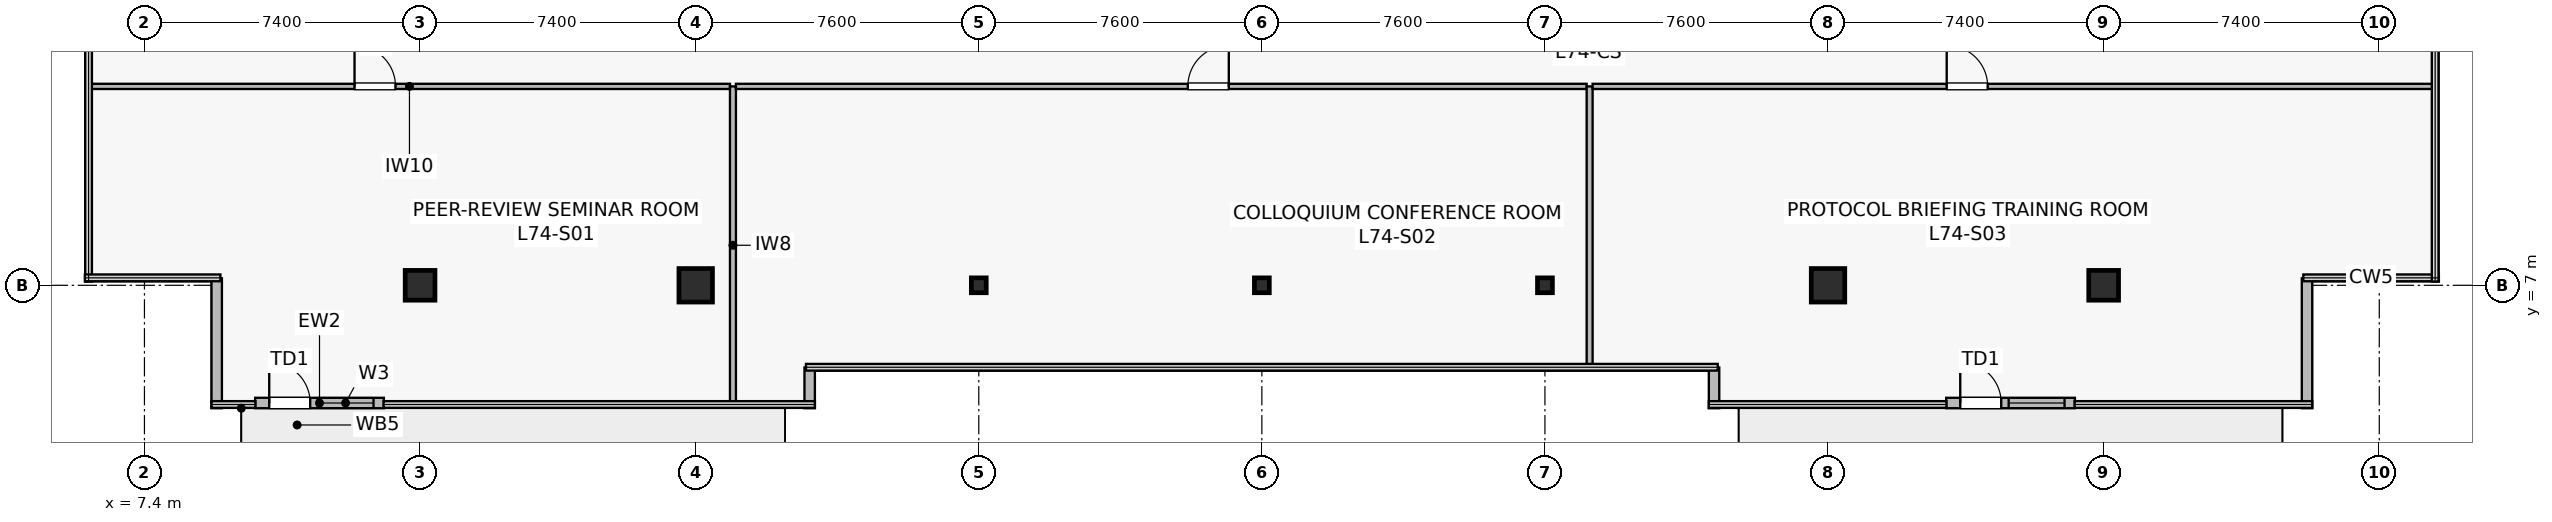
"""IFC4 building model, lengths in metres.
Left out: names, types, materials, properties, quantities, classifications, styles, units other than length and angle.
Written with IfcOpenShell. Run it as: python <this file> out.ifc"""

import sys

from ifc_helpers import new_model, si_unit, direction, frame, frame_2d, origin, origin_2d, place, context, subcontext, project, spatial, rectangle, i_section, extrude, source, transform, mapped, element, fill, save


model = new_model("IFC4")
c1 = context("Model", 3, precision=1e-05, world=origin(), true_north=direction((0.0, 1.0)))
c2 = subcontext(c1, "Body", "Model", "MODEL_VIEW")
j1 = project(units=[si_unit("LENGTHUNIT", "METRE"), si_unit("PLANEANGLEUNIT", "RADIAN")], contexts=[c1])
p1 = place(None, origin())
s1 = spatial("IfcSite", under=j1, at=p1, CompositionType="ELEMENT")
p2 = place(p1, origin())
s2 = spatial("IfcBuilding", under=s1, at=p2, CompositionType="ELEMENT")
p3 = place(p2, frame((0.0, 0.0, 310.2)))
s3 = spatial("IfcBuildingStorey", under=s2, at=p3, CompositionType="ELEMENT", Elevation=310.2)
m1 = source(origin(), c2, "Body", "SweptSolid", [
    extrude(rectangle(XDim=0.8, YDim=0.8, at=origin_2d()), origin(), (0.0, 0.0, 1.0), 4.2),
])
p4 = place(p3, frame((14.8, 7.0, 0.0), z_axis=(0.0, 0.0, 1.0), x_axis=(1.0, 0.0, 0.0)))
e1 = element("IfcColumn", 1, at=p4, inside=s3, PredefinedType="COLUMN", context=c2, shape_type="MappedRepresentation", body=[
    mapped(m1, transform((0.0, 0.0, 0.0), scale=1.0)),
])
m2 = source(origin(), c2, "Body", "SweptSolid", [
    extrude(rectangle(XDim=0.9, YDim=0.9, at=origin_2d()), origin(), (0.0, 0.0, 1.0), 4.2),
])
for number, where, z_axis, x_axis in (
    (2, (22.2, 7.0, 0.0), (0.0, 0.0, 1.0), (1.0, 0.0, 0.0)),
    (3, (52.6, 7.0, 0.0), (0.0, 0.0, 1.0), (1.0, 0.0, 0.0)),
):
    element("IfcColumn", number, at=place(p3, frame(where, z_axis=z_axis, x_axis=x_axis)), inside=s3, PredefinedType="COLUMN", context=c2, shape_type="MappedRepresentation", body=[
        mapped(m2, transform((0.0, 0.0, 0.0), scale=1.0)),
    ])
p5 = place(p3, frame((60.0, 7.0, 0.0), z_axis=(0.0, 0.0, 1.0), x_axis=(1.0, 0.0, 0.0)))
e4 = element("IfcColumn", 4, at=p5, inside=s3, PredefinedType="COLUMN", context=c2, shape_type="MappedRepresentation", body=[
    mapped(m1, transform((0.0, 0.0, 0.0), scale=1.0)),
])
m3 = source(origin(), c2, "Body", "SweptSolid", [
    extrude(i_section(OverallWidth=0.4, OverallDepth=0.4, WebThickness=0.021, FlangeThickness=0.021, at=origin_2d()), origin(), (0.0, 0.0, 1.0), 4.2),
])
for number, where, z_axis, x_axis in (
    (5, (29.8, 7.0, 0.0), (0.0, 0.0, 1.0), (1.0, 0.0, 0.0)),
    (6, (37.4, 7.0, 0.0), (0.0, 0.0, 1.0), (1.0, 0.0, 0.0)),
    (7, (45.0, 7.0, 0.0), (0.0, 0.0, 1.0), (1.0, 0.0, 0.0)),
):
    element("IfcColumn", number, at=place(p3, frame(where, z_axis=z_axis, x_axis=x_axis)), inside=s3, PredefinedType="COLUMN", context=c2, shape_type="MappedRepresentation", body=[
        mapped(m3, transform((0.0, 0.0, 0.0), scale=1.0)),
    ])
p6 = place(p3, frame((10.372, 3.84, 0.0), z_axis=(0.0, 0.0, 1.0), x_axis=(1.0, 0.0, 0.0)))
e8 = element("IfcWall", 8, at=p6, inside=s3, PredefinedType="STANDARD", context=c2, shape_type="SweptSolid", body=[
    extrude(rectangle(XDim=3.456, YDim=0.28, at=frame_2d((1.728, 0.0))), origin(), (0.0, 0.0, 1.0), 3.9),
])
p7 = place(p6, frame((0.378, 0.0, 0.0)))
e9 = element("IfcOpeningElement", 9, at=p7, cuts=e8, PredefinedType="OPENING", context=c2, shape_type="SweptSolid", body=[
    extrude(rectangle(XDim=1.1, YDim=2.2, at=frame_2d((0.55, 1.1))), frame((0.0, 0.15, 0.0), z_axis=(0.0, -1.0, 0.0), x_axis=(1.0, 0.0, 0.0)), (0.0, 0.0, 1.0), 0.3),
])
p8 = place(p6, frame((1.678, 0.0, 0.9)))
e10 = element("IfcOpeningElement", 10, at=p8, cuts=e8, PredefinedType="OPENING", context=c2, shape_type="SweptSolid", body=[
    extrude(rectangle(XDim=1.5, YDim=2.2, at=frame_2d((0.75, 1.1))), frame((0.0, 0.15, 0.0), z_axis=(0.0, -1.0, 0.0), x_axis=(1.0, 0.0, 0.0)), (0.0, 0.0, 1.0), 0.3),
])
p9 = place(p3, frame((55.772, 3.84, 0.0), z_axis=(0.0, 0.0, 1.0), x_axis=(1.0, 0.0, 0.0)))
e11 = element("IfcWall", 11, at=p9, inside=s3, PredefinedType="STANDARD", context=c2, shape_type="SweptSolid", body=[
    extrude(rectangle(XDim=3.456, YDim=0.28, at=frame_2d((1.728, 0.0))), origin(), (0.0, 0.0, 1.0), 3.9),
])
p10 = place(p9, frame((0.378, 0.0, 0.0)))
e12 = element("IfcOpeningElement", 12, at=p10, cuts=e11, PredefinedType="OPENING", context=c2, shape_type="SweptSolid", body=[
    extrude(rectangle(XDim=1.1, YDim=2.2, at=frame_2d((0.55, 1.1))), frame((0.0, 0.15, 0.0), z_axis=(0.0, -1.0, 0.0), x_axis=(1.0, 0.0, 0.0)), (0.0, 0.0, 1.0), 0.3),
])
p11 = place(p9, frame((1.678, 0.0, 0.9)))
e13 = element("IfcOpeningElement", 13, at=p11, cuts=e11, PredefinedType="OPENING", context=c2, shape_type="SweptSolid", body=[
    extrude(rectangle(XDim=1.5, YDim=2.2, at=frame_2d((0.75, 1.1))), frame((0.0, 0.15, 0.0), z_axis=(0.0, -1.0, 0.0), x_axis=(1.0, 0.0, 0.0)), (0.0, 0.0, 1.0), 0.3),
])
for number, where, z_axis, x_axis in (
    (14, (25.26, 3.7, 0.0), (0.0, 0.0, 1.0), (0.0, 1.0, 0.0)),
    (15, (49.54, 4.793, 0.0), (0.0, 0.0, 1.0), (0.0, -1.0, 0.0)),
):
    element("IfcWall", number, at=place(p3, frame(where, z_axis=z_axis, x_axis=x_axis)), inside=s3, PredefinedType="STANDARD", context=c2, shape_type="SweptSolid", body=[
        extrude(rectangle(XDim=1.093, YDim=0.28, at=frame_2d((0.546, 0.0))), origin(), (0.0, 0.0, 1.0), 3.9),
    ])
for number, where, z_axis, x_axis in (
    (16, (65.46, 3.7, 0.0), (0.0, 0.0, 1.0), (0.0, 1.0, 0.0)),
    (17, (9.34, 7.188, 0.0), (0.0, 0.0, 1.0), (0.0, -1.0, 0.0)),
):
    element("IfcWall", number, at=place(p3, frame(where, z_axis=z_axis, x_axis=x_axis)), inside=s3, PredefinedType="STANDARD", context=c2, shape_type="SweptSolid", body=[
        extrude(rectangle(XDim=3.488, YDim=0.28, at=frame_2d((1.744, 0.0))), origin(), (0.0, 0.0, 1.0), 3.9),
    ])
p12 = place(p3, frame((5.91, 12.34, 0.0), z_axis=(0.0, 0.0, 1.0), x_axis=(1.0, 0.0, 0.0)))
e18 = element("IfcWall", 18, at=p12, inside=s3, PredefinedType="PARTITIONING", context=c2, shape_type="SweptSolid", body=[
    extrude(rectangle(XDim=17.21, YDim=0.14, at=frame_2d((8.605, 0.0))), origin(), (0.0, 0.0, 1.0), 3.297),
])
p13 = place(p12, frame((7.13, 0.0, 0.0)))
e19 = element("IfcOpeningElement", 19, at=p13, cuts=e18, PredefinedType="OPENING", context=c2, shape_type="SweptSolid", body=[
    extrude(rectangle(XDim=1.1, YDim=2.18, at=frame_2d((0.55, 1.09))), frame((0.0, 0.08, 0.0), z_axis=(0.0, -1.0, 0.0), x_axis=(1.0, 0.0, 0.0)), (0.0, 0.0, 1.0), 0.16),
])
p14 = place(p3, frame((23.2, 3.81, 0.0), z_axis=(0.0, 0.0, 1.0), x_axis=(0.0, 1.0, 0.0)))
e20 = element("IfcWall", 20, at=p14, inside=s3, PredefinedType="PARTITIONING", context=c2, shape_type="SweptSolid", body=[
    extrude(rectangle(XDim=8.53, YDim=0.16, at=frame_2d((4.265, 0.0))), origin(), (0.0, 0.0, 1.0), 2.985),
])
p15 = place(p3, frame((23.28, 12.34, 0.0), z_axis=(0.0, 0.0, 1.0), x_axis=(1.0, 0.0, 0.0)))
e21 = element("IfcWall", 21, at=p15, inside=s3, PredefinedType="PARTITIONING", context=c2, shape_type="SweptSolid", body=[
    extrude(rectangle(XDim=22.84, YDim=0.14, at=frame_2d((11.42, 0.0))), origin(), (0.0, 0.0, 1.0), 3.297),
])
p16 = place(p15, frame((12.132, 0.0, 0.0)))
e22 = element("IfcOpeningElement", 22, at=p16, cuts=e21, PredefinedType="OPENING", context=c2, shape_type="SweptSolid", body=[
    extrude(rectangle(XDim=1.1, YDim=2.18, at=frame_2d((0.55, 1.09))), frame((0.0, 0.08, 0.0), z_axis=(0.0, -1.0, 0.0), x_axis=(1.0, 0.0, 0.0)), (0.0, 0.0, 1.0), 0.16),
])
p17 = place(p3, frame((46.2, 4.81, 0.0), z_axis=(0.0, 0.0, 1.0), x_axis=(0.0, 1.0, 0.0)))
e23 = element("IfcWall", 23, at=p17, inside=s3, PredefinedType="PARTITIONING", context=c2, shape_type="SweptSolid", body=[
    extrude(rectangle(XDim=7.53, YDim=0.16, at=frame_2d((3.765, 0.0))), origin(), (0.0, 0.0, 1.0), 2.985),
])
p18 = place(p3, frame((46.28, 12.34, 0.0), z_axis=(0.0, 0.0, 1.0), x_axis=(1.0, 0.0, 0.0)))
e24 = element("IfcWall", 24, at=p18, inside=s3, PredefinedType="PARTITIONING", context=c2, shape_type="SweptSolid", body=[
    extrude(rectangle(XDim=22.61, YDim=0.14, at=frame_2d((11.305, 0.0))), origin(), (0.0, 0.0, 1.0), 3.297),
])
p19 = place(p18, frame((9.506, 0.0, 0.0)))
e25 = element("IfcOpeningElement", 25, at=p19, cuts=e24, PredefinedType="OPENING", context=c2, shape_type="SweptSolid", body=[
    extrude(rectangle(XDim=1.1, YDim=2.18, at=frame_2d((0.55, 1.09))), frame((0.0, 0.08, 0.0), z_axis=(0.0, -1.0, 0.0), x_axis=(1.0, 0.0, 0.0)), (0.0, 0.0, 1.0), 0.16),
])
m4 = source(origin(), c2, "Body", "SweptSolid", [
    extrude(rectangle(XDim=1.1, YDim=2.2, at=frame_2d((0.55, 1.1))), frame((0.0, 0.025, 0.0), z_axis=(0.0, -1.0, 0.0), x_axis=(1.0, 0.0, 0.0)), (0.0, 0.0, 1.0), 0.05),
])
p20 = place(p7, origin())
e26 = element("IfcDoor", 26, at=p20, inside=s3, OperationType="SINGLE_SWING_LEFT", PredefinedType="DOOR", context=c2, shape_type="MappedRepresentation", body=[
    mapped(m4, transform((0.0, 0.0, 0.0), scale=1.0)),
])
fill(e9, e26)
m5 = source(origin(), c2, "Body", "SweptSolid", [
    extrude(rectangle(XDim=1.5, YDim=2.2, at=frame_2d((0.75, 1.1))), frame((0.0, 0.03, 0.0), z_axis=(0.0, -1.0, 0.0), x_axis=(1.0, 0.0, 0.0)), (0.0, 0.0, 1.0), 0.06),
])
p21 = place(p8, origin())
e27 = element("IfcWindow", 27, at=p21, inside=s3, PartitioningType="SINGLE_PANEL", PredefinedType="WINDOW", context=c2, shape_type="MappedRepresentation", body=[
    mapped(m5, transform((0.0, 0.0, 0.0), scale=1.0)),
])
fill(e10, e27)
p22 = place(p10, origin())
e28 = element("IfcDoor", 28, at=p22, inside=s3, OperationType="SINGLE_SWING_LEFT", PredefinedType="DOOR", context=c2, shape_type="MappedRepresentation", body=[
    mapped(m4, transform((0.0, 0.0, 0.0), scale=1.0)),
])
fill(e12, e28)
p23 = place(p11, origin())
e29 = element("IfcWindow", 29, at=p23, inside=s3, PartitioningType="SINGLE_PANEL", PredefinedType="WINDOW", context=c2, shape_type="MappedRepresentation", body=[
    mapped(m5, transform((0.0, 0.0, 0.0), scale=1.0)),
])
fill(e13, e29)
m6 = source(origin(), c2, "Body", "SweptSolid", [
    extrude(rectangle(XDim=1.1, YDim=2.18, at=frame_2d((0.55, 1.09))), frame((0.0, 0.025, 0.0), z_axis=(0.0, -1.0, 0.0), x_axis=(1.0, 0.0, 0.0)), (0.0, 0.0, 1.0), 0.05),
])
p24 = place(p13, origin())
e30 = element("IfcDoor", 30, at=p24, inside=s3, OperationType="SINGLE_SWING_LEFT", PredefinedType="DOOR", context=c2, shape_type="MappedRepresentation", body=[
    mapped(m6, transform((0.0, 0.0, 0.0), scale=1.0)),
])
fill(e19, e30)
p25 = place(p16, origin())
e31 = element("IfcDoor", 31, at=p25, inside=s3, OperationType="SINGLE_SWING_RIGHT", PredefinedType="DOOR", context=c2, shape_type="MappedRepresentation", body=[
    mapped(m6, transform((0.0, 0.0, 0.0), scale=1.0)),
])
fill(e22, e31)
p26 = place(p19, origin())
e32 = element("IfcDoor", 32, at=p26, inside=s3, OperationType="SINGLE_SWING_LEFT", PredefinedType="DOOR", context=c2, shape_type="MappedRepresentation", body=[
    mapped(m6, transform((0.0, 0.0, 0.0), scale=1.0)),
])
fill(e25, e32)
save(model, sys.argv[1])
